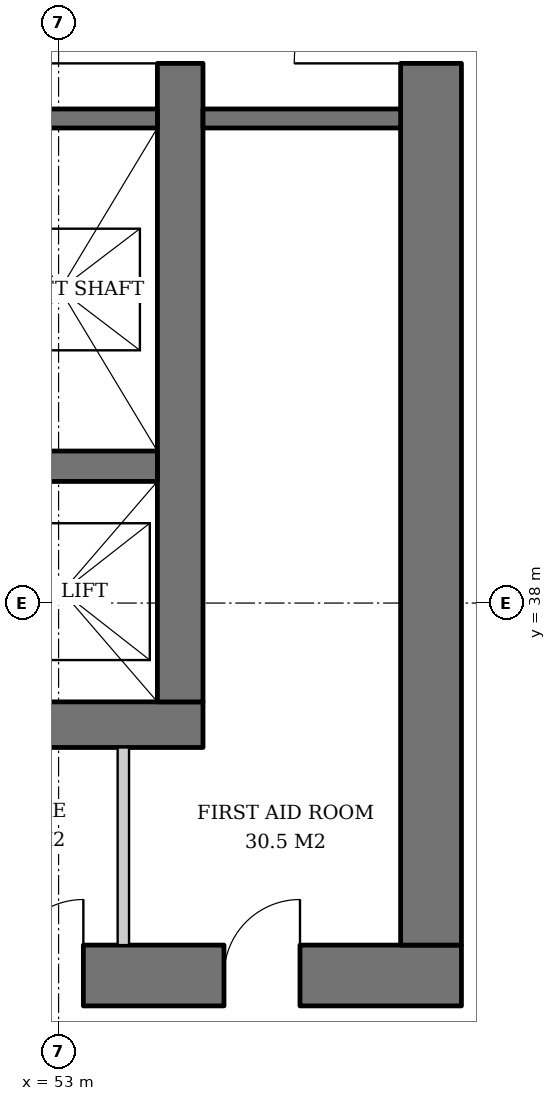
"""IFC4 building model, lengths in metres.
Left out: names, types, materials, properties, quantities, classifications, styles, units other than length and angle.
Written with IfcOpenShell. Run it as: python <this file> out.ifc"""

import sys

from ifc_helpers import new_model, si_unit, direction, frame, frame_2d, origin, place, context, subcontext, project, spatial, rectangle, extrude, element, fill, save


model = new_model("IFC4")
c1 = context("Model", 3, precision=1e-05, world=origin(), true_north=direction((0.0, 1.0)))
c2 = subcontext(c1, "Body", "Model", "MODEL_VIEW")
j1 = project(units=[si_unit("LENGTHUNIT", "METRE"), si_unit("PLANEANGLEUNIT", "RADIAN")], contexts=[c1])
p1 = place(None, origin())
s1 = spatial("IfcSite", under=j1, at=p1, CompositionType="ELEMENT")
p2 = place(p1, origin())
s2 = spatial("IfcBuilding", under=s1, at=p2, CompositionType="ELEMENT")
p3 = place(p2, frame((0.0, 0.0, 47.6)))
s3 = spatial("IfcBuildingStorey", under=s2, at=p3, CompositionType="ELEMENT", Elevation=47.6)
p4 = place(p3, frame((35.1, 36.4, 0.0), z_axis=(0.0, 0.0, 1.0), x_axis=(1.0, 0.0, 0.0)))
e1 = element("IfcWall", 1, at=p4, inside=s3, PredefinedType="SHEAR", context=c2, shape_type="SweptSolid", body=[
    extrude(rectangle(XDim=19.8, YDim=0.6, at=frame_2d((9.9, 0.0))), origin(), (0.0, 0.0, 1.0), 3.8),
])
p5 = place(p4, frame((3.9, 0.0, 0.0)))
e2 = element("IfcOpeningElement", 2, at=p5, cuts=e1, PredefinedType="OPENING", context=c2, shape_type="SweptSolid", body=[
    extrude(rectangle(XDim=1.0, YDim=2.1, at=frame_2d((0.5, 1.05))), frame((0.0, 0.31, 0.0), z_axis=(0.0, -1.0, 0.0), x_axis=(1.0, 0.0, 0.0)), (0.0, 0.0, 1.0), 0.62),
])
p6 = place(p4, frame((15.35, 0.0, 0.0)))
e3 = element("IfcOpeningElement", 3, at=p6, cuts=e1, PredefinedType="OPENING", context=c2, shape_type="SweptSolid", body=[
    extrude(rectangle(XDim=1.0, YDim=2.1, at=frame_2d((0.5, 1.05))), frame((0.0, 0.31, 0.0), z_axis=(0.0, -1.0, 0.0), x_axis=(1.0, 0.0, 0.0)), (0.0, 0.0, 1.0), 0.62),
])
p7 = place(p3, frame((54.6, 36.7, 0.0), z_axis=(0.0, 0.0, 1.0), x_axis=(0.0, 1.0, 0.0)))
e4 = element("IfcWall", 4, at=p7, inside=s3, PredefinedType="SHEAR", context=c2, shape_type="SweptSolid", body=[
    extrude(rectangle(XDim=18.6, YDim=0.6, at=frame_2d((9.3, 0.0))), origin(), (0.0, 0.0, 1.0), 3.8),
])
p8 = place(p7, frame((8.4, 0.0, 0.0)))
e5 = element("IfcOpeningElement", 5, at=p8, cuts=e4, PredefinedType="OPENING", context=c2, shape_type="SweptSolid", body=[
    extrude(rectangle(XDim=1.8, YDim=2.4, at=frame_2d((0.9, 1.2))), frame((0.0, 0.31, 0.0), z_axis=(0.0, -1.0, 0.0), x_axis=(1.0, 0.0, 0.0)), (0.0, 0.0, 1.0), 0.62),
])
p9 = place(p3, frame((31.7, 33.1, 0.0), z_axis=(0.0, 0.0, 1.0), x_axis=(1.0, 0.0, 0.0)))
e6 = element("IfcWall", 6, at=p9, inside=s3, PredefinedType="SHEAR", context=c2, shape_type="SweptSolid", body=[
    extrude(rectangle(XDim=26.6, YDim=0.8, at=frame_2d((13.3, 0.0))), origin(), (0.0, 0.0, 1.0), 3.8),
])
p10 = place(p9, frame((7.3, 0.0, 0.0)))
e7 = element("IfcOpeningElement", 7, at=p10, cuts=e6, PredefinedType="OPENING", context=c2, shape_type="SweptSolid", body=[
    extrude(rectangle(XDim=1.0, YDim=2.1, at=frame_2d((0.5, 1.05))), frame((0.0, 0.41, 0.0), z_axis=(0.0, -1.0, 0.0), x_axis=(1.0, 0.0, 0.0)), (0.0, 0.0, 1.0), 0.82),
])
p11 = place(p9, frame((18.75, 0.0, 0.0)))
e8 = element("IfcOpeningElement", 8, at=p11, cuts=e6, PredefinedType="OPENING", context=c2, shape_type="SweptSolid", body=[
    extrude(rectangle(XDim=1.0, YDim=2.1, at=frame_2d((0.5, 1.05))), frame((0.0, 0.41, 0.0), z_axis=(0.0, -1.0, 0.0), x_axis=(1.0, 0.0, 0.0)), (0.0, 0.0, 1.0), 0.82),
])
p12 = place(p9, frame((1.9, 0.0, 0.0)))
e9 = element("IfcOpeningElement", 9, at=p12, cuts=e6, PredefinedType="OPENING", context=c2, shape_type="SweptSolid", body=[
    extrude(rectangle(XDim=1.0, YDim=2.1, at=frame_2d((0.5, 1.05))), frame((0.0, 0.41, 0.0), z_axis=(0.0, -1.0, 0.0), x_axis=(1.0, 0.0, 0.0)), (0.0, 0.0, 1.0), 0.82),
])
p13 = place(p9, frame((4.725, 0.0, 0.0)))
e10 = element("IfcOpeningElement", 10, at=p13, cuts=e6, PredefinedType="OPENING", context=c2, shape_type="SweptSolid", body=[
    extrude(rectangle(XDim=1.0, YDim=2.1, at=frame_2d((0.5, 1.05))), frame((0.0, 0.41, 0.0), z_axis=(0.0, -1.0, 0.0), x_axis=(1.0, 0.0, 0.0)), (0.0, 0.0, 1.0), 0.82),
])
p14 = place(p9, frame((12.44, 0.0, 0.0)))
e11 = element("IfcOpeningElement", 11, at=p14, cuts=e6, PredefinedType="OPENING", context=c2, shape_type="SweptSolid", body=[
    extrude(rectangle(XDim=1.0, YDim=2.1, at=frame_2d((0.5, 1.05))), frame((0.0, 0.41, 0.0), z_axis=(0.0, -1.0, 0.0), x_axis=(1.0, 0.0, 0.0)), (0.0, 0.0, 1.0), 0.82),
])
p15 = place(p9, frame((20.626, 0.0, 0.0)))
e12 = element("IfcOpeningElement", 12, at=p15, cuts=e6, PredefinedType="OPENING", context=c2, shape_type="SweptSolid", body=[
    extrude(rectangle(XDim=1.0, YDim=2.1, at=frame_2d((0.5, 1.05))), frame((0.0, 0.41, 0.0), z_axis=(0.0, -1.0, 0.0), x_axis=(1.0, 0.0, 0.0)), (0.0, 0.0, 1.0), 0.82),
])
p16 = place(p9, frame((23.476, 0.0, 0.0)))
e13 = element("IfcOpeningElement", 13, at=p16, cuts=e6, PredefinedType="OPENING", context=c2, shape_type="SweptSolid", body=[
    extrude(rectangle(XDim=1.0, YDim=2.1, at=frame_2d((0.5, 1.05))), frame((0.0, 0.41, 0.0), z_axis=(0.0, -1.0, 0.0), x_axis=(1.0, 0.0, 0.0)), (0.0, 0.0, 1.0), 0.82),
])
p17 = place(p3, frame((57.9, 33.5, 0.0), z_axis=(0.0, 0.0, 1.0), x_axis=(0.0, 1.0, 0.0)))
e14 = element("IfcWall", 14, at=p17, inside=s3, PredefinedType="SHEAR", context=c2, shape_type="SweptSolid", body=[
    extrude(rectangle(XDim=25.0, YDim=0.8, at=frame_2d((12.5, 0.0))), origin(), (0.0, 0.0, 1.0), 3.8),
])
p18 = place(p17, frame((11.6, 0.0, 0.0)))
e15 = element("IfcOpeningElement", 15, at=p18, cuts=e14, PredefinedType="OPENING", context=c2, shape_type="SweptSolid", body=[
    extrude(rectangle(XDim=1.8, YDim=2.4, at=frame_2d((0.9, 1.2))), frame((0.0, 0.41, 0.0), z_axis=(0.0, -1.0, 0.0), x_axis=(1.0, 0.0, 0.0)), (0.0, 0.0, 1.0), 0.82),
])
p19 = place(p3, frame((35.7, 39.8, 0.0), z_axis=(0.0, 0.0, 1.0), x_axis=(1.0, 0.0, 0.0)))
e16 = element("IfcWall", 16, at=p19, inside=s3, PredefinedType="SHEAR", context=c2, shape_type="SweptSolid", body=[
    extrude(rectangle(XDim=18.6, YDim=0.4, at=frame_2d((9.3, 0.0))), origin(), (0.0, 0.0, 1.0), 3.8),
])
p20 = place(p3, frame((48.93, 44.375, 0.0), z_axis=(0.0, 0.0, 1.0), x_axis=(1.0, 0.0, 0.0)))
e17 = element("IfcWall", 17, at=p20, inside=s3, PredefinedType="SHEAR", context=c2, shape_type="SweptSolid", body=[
    extrude(rectangle(XDim=5.37, YDim=0.25, at=frame_2d((2.685, 0.0))), origin(), (0.0, 0.0, 1.0), 3.8),
])
p21 = place(p3, frame((54.9, 44.375, 0.0), z_axis=(0.0, 0.0, 1.0), x_axis=(1.0, 0.0, 0.0)))
e18 = element("IfcWall", 18, at=p21, inside=s3, PredefinedType="SOLIDWALL", context=c2, shape_type="SweptSolid", body=[
    extrude(rectangle(XDim=2.6, YDim=0.25, at=frame_2d((1.3, 0.0))), origin(), (0.0, 0.0, 1.0), 3.62),
])
p22 = place(p3, frame((53.852, 33.5, 0.0), z_axis=(0.0, 0.0, 1.0), x_axis=(0.0, 1.0, 0.0)))
e19 = element("IfcWall", 19, at=p22, inside=s3, PredefinedType="SOLIDWALL", context=c2, shape_type="SweptSolid", body=[
    extrude(rectangle(XDim=2.6, YDim=0.15, at=frame_2d((1.3, 0.0))), origin(), (0.0, 0.0, 1.0), 3.62),
])
p23 = place(p8, origin())
e20 = element("IfcDoor", 20, at=p23, inside=s3, OperationType="DOUBLE_DOOR_SINGLE_SWING", PredefinedType="DOOR", context=c2, shape_type="SweptSolid", body=[
    extrude(rectangle(XDim=1.8, YDim=2.4, at=frame_2d((0.9, 1.2))), frame((0.0, 0.025, 0.0), z_axis=(0.0, -1.0, 0.0), x_axis=(1.0, 0.0, 0.0)), (0.0, 0.0, 1.0), 0.05),
])
fill(e5, e20)
p24 = place(p18, origin())
e21 = element("IfcDoor", 21, at=p24, inside=s3, OperationType="DOUBLE_DOOR_SINGLE_SWING", PredefinedType="DOOR", context=c2, shape_type="SweptSolid", body=[
    extrude(rectangle(XDim=1.8, YDim=2.4, at=frame_2d((0.9, 1.2))), frame((0.0, 0.025, 0.0), z_axis=(0.0, -1.0, 0.0), x_axis=(1.0, 0.0, 0.0)), (0.0, 0.0, 1.0), 0.05),
])
fill(e15, e21)
p25 = place(p15, origin())
e22 = element("IfcDoor", 22, at=p25, inside=s3, OperationType="SINGLE_SWING_RIGHT", PredefinedType="DOOR", context=c2, shape_type="SweptSolid", body=[
    extrude(rectangle(XDim=1.0, YDim=2.1, at=frame_2d((0.5, 1.05))), frame((0.0, 0.39, 0.0), z_axis=(0.0, -1.0, 0.0), x_axis=(1.0, 0.0, 0.0)), (0.0, 0.0, 1.0), 0.05),
])
fill(e12, e22)
p26 = place(p16, origin())
e23 = element("IfcDoor", 23, at=p26, inside=s3, OperationType="SINGLE_SWING_RIGHT", PredefinedType="DOOR", context=c2, shape_type="SweptSolid", body=[
    extrude(rectangle(XDim=1.0, YDim=2.1, at=frame_2d((0.5, 1.05))), frame((0.0, 0.39, 0.0), z_axis=(0.0, -1.0, 0.0), x_axis=(1.0, 0.0, 0.0)), (0.0, 0.0, 1.0), 0.05),
])
fill(e13, e23)
save(model, sys.argv[1])
